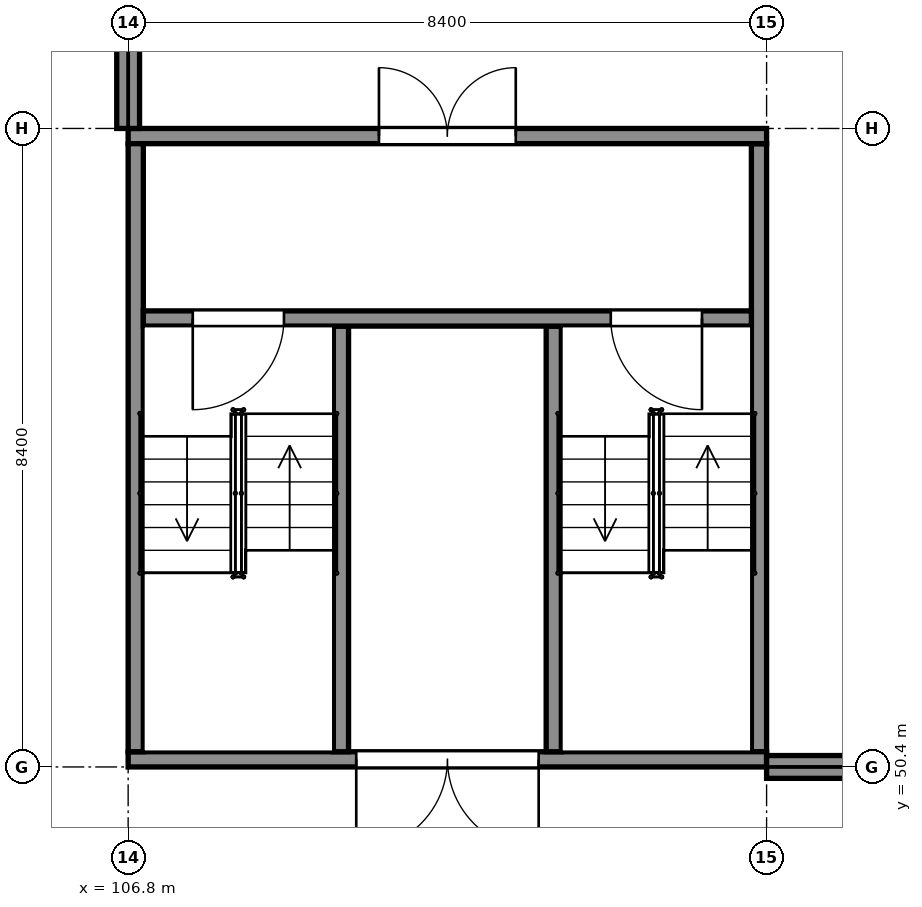
"""IFC4 building model, lengths in metres.
Left out: names, types, materials, properties, quantities, classifications, styles, units other than length and angle.
Written with IfcOpenShell. Run it as: python <this file> out.ifc"""

import sys

from ifc_helpers import new_model, si_unit, direction, frame, frame_2d, origin, place, context, subcontext, project, spatial, rectangle, extrude, element, fill, save


model = new_model("IFC4")
c1 = context("Model", 3, precision=1e-05, world=origin(), true_north=direction((0.0, 1.0)))
c2 = subcontext(c1, "Body", "Model", "MODEL_VIEW")
j1 = project(units=[si_unit("LENGTHUNIT", "METRE"), si_unit("PLANEANGLEUNIT", "RADIAN")], contexts=[c1])
p1 = place(None, origin())
s1 = spatial("IfcSite", under=j1, at=p1, CompositionType="ELEMENT")
p2 = place(p1, origin())
s2 = spatial("IfcBuilding", under=s1, at=p2, CompositionType="ELEMENT")
p3 = place(p2, origin())
s3 = spatial("IfcBuildingStorey", under=s2, at=p3, CompositionType="ELEMENT", Elevation=0.0)
p4 = place(p3, frame((115.2, 50.5, -1.8), z_axis=(0.0, 0.0, 1.0), x_axis=(-1.0, 0.0, 0.0)))
e1 = element("IfcWall", 1, at=p4, inside=s3, PredefinedType="SHEAR", context=c2, shape_type="SweptSolid", body=[
    extrude(rectangle(XDim=8.4, YDim=0.2, at=frame_2d((4.2, 0.0))), origin(), (0.0, 0.0, 1.0), 7.3),
])
p5 = place(p4, frame((2.999, 0.0, 1.8)))
e2 = element("IfcOpeningElement", 2, at=p5, cuts=e1, PredefinedType="OPENING", context=c2, shape_type="SweptSolid", body=[
    extrude(rectangle(XDim=2.4, YDim=2.1, at=frame_2d((1.2, 1.05))), frame((0.0, 0.11, 0.0), z_axis=(0.0, -1.0, 0.0), x_axis=(1.0, 0.0, 0.0)), (0.0, 0.0, 1.0), 0.22),
])
p6 = place(p3, frame((106.8, 58.7, -1.8), z_axis=(0.0, 0.0, 1.0), x_axis=(1.0, 0.0, 0.0)))
e3 = element("IfcWall", 3, at=p6, inside=s3, PredefinedType="SHEAR", context=c2, shape_type="SweptSolid", body=[
    extrude(rectangle(XDim=8.4, YDim=0.2, at=frame_2d((4.2, 0.0))), origin(), (0.0, 0.0, 1.0), 7.3),
])
p7 = place(p6, frame((3.3, 0.0, 1.8)))
e4 = element("IfcOpeningElement", 4, at=p7, cuts=e3, PredefinedType="OPENING", context=c2, shape_type="SweptSolid", body=[
    extrude(rectangle(XDim=1.8, YDim=2.1, at=frame_2d((0.9, 1.05))), frame((0.0, 0.11, 0.0), z_axis=(0.0, -1.0, 0.0), x_axis=(1.0, 0.0, 0.0)), (0.0, 0.0, 1.0), 0.22),
])
for number, where, z_axis, x_axis in (
    (5, (106.9, 50.6, -1.8), (0.0, 0.0, 1.0), (0.0, 1.0, 0.0)),
    (6, (115.1, 50.6, -1.8), (0.0, 0.0, 1.0), (0.0, 1.0, 0.0)),
):
    element("IfcWall", number, at=place(p3, frame(where, z_axis=z_axis, x_axis=x_axis)), inside=s3, PredefinedType="SHEAR", context=c2, shape_type="SweptSolid", body=[
        extrude(rectangle(XDim=8.0, YDim=0.2, at=frame_2d((4.0, 0.0))), origin(), (0.0, 0.0, 1.0), 7.3),
    ])
p8 = place(p3, frame((107.0, 56.3, -1.8), z_axis=(0.0, 0.0, 1.0), x_axis=(1.0, 0.0, 0.0)))
e7 = element("IfcWall", 7, at=p8, inside=s3, PredefinedType="SHEAR", context=c2, shape_type="SweptSolid", body=[
    extrude(rectangle(XDim=8.0, YDim=0.2, at=frame_2d((4.0, 0.0))), origin(), (0.0, 0.0, 1.0), 7.3),
])
p9 = place(p8, frame((0.65, 0.0, 1.8)))
e8 = element("IfcOpeningElement", 8, at=p9, cuts=e7, PredefinedType="OPENING", context=c2, shape_type="SweptSolid", body=[
    extrude(rectangle(XDim=1.2, YDim=2.1, at=frame_2d((0.6, 1.05))), frame((0.0, 0.11, 0.0), z_axis=(0.0, -1.0, 0.0), x_axis=(1.0, 0.0, 0.0)), (0.0, 0.0, 1.0), 0.22),
])
p10 = place(p8, frame((6.15, 0.0, 1.8)))
e9 = element("IfcOpeningElement", 9, at=p10, cuts=e7, PredefinedType="OPENING", context=c2, shape_type="SweptSolid", body=[
    extrude(rectangle(XDim=1.2, YDim=2.1, at=frame_2d((0.6, 1.05))), frame((0.0, 0.11, 0.0), z_axis=(0.0, -1.0, 0.0), x_axis=(1.0, 0.0, 0.0)), (0.0, 0.0, 1.0), 0.22),
])
for number, where, z_axis, x_axis in (
    (10, (109.6, 50.6, -1.8), (0.0, 0.0, 1.0), (0.0, 1.0, 0.0)),
    (11, (112.4, 50.6, -1.8), (0.0, 0.0, 1.0), (0.0, 1.0, 0.0)),
):
    element("IfcWall", number, at=place(p3, frame(where, z_axis=z_axis, x_axis=x_axis)), inside=s3, PredefinedType="SHEAR", context=c2, shape_type="SweptSolid", body=[
        extrude(rectangle(XDim=5.6, YDim=0.2, at=frame_2d((2.8, 0.0))), origin(), (0.0, 0.0, 1.0), 7.3),
    ])
p11 = place(p3, frame((106.8, 58.8, 0.0), z_axis=(0.0, 0.0, 1.0), x_axis=(0.0, 1.0, 0.0)))
e12 = element("IfcWall", 12, at=p11, inside=s3, PredefinedType="SOLIDWALL", context=c2, shape_type="SweptSolid", body=[
    extrude(rectangle(XDim=8.4, YDim=0.3, at=frame_2d((4.2, 0.0))), origin(), (0.0, 0.0, 1.0), 4.44),
])
p12 = place(p11, frame((2.5, 0.0, 1.5)))
e13 = element("IfcOpeningElement", 13, at=p12, cuts=e12, PredefinedType="OPENING", context=c2, shape_type="SweptSolid", body=[
    extrude(rectangle(XDim=0.6, YDim=2.4, at=frame_2d((0.3, 1.2))), frame((0.0, 0.16, 0.0), z_axis=(0.0, -1.0, 0.0), x_axis=(1.0, 0.0, 0.0)), (0.0, 0.0, 1.0), 0.32),
])
p13 = place(p11, frame((5.3, 0.0, 1.5)))
e14 = element("IfcOpeningElement", 14, at=p13, cuts=e12, PredefinedType="OPENING", context=c2, shape_type="SweptSolid", body=[
    extrude(rectangle(XDim=0.6, YDim=2.4, at=frame_2d((0.3, 1.2))), frame((0.0, 0.16, 0.0), z_axis=(0.0, -1.0, 0.0), x_axis=(1.0, 0.0, 0.0)), (0.0, 0.0, 1.0), 0.32),
])
p14 = place(p3, frame((115.2, 50.4, 0.0), z_axis=(0.0, 0.0, 1.0), x_axis=(1.0, 0.0, 0.0)))
e15 = element("IfcWall", 15, at=p14, inside=s3, PredefinedType="SOLIDWALL", context=c2, shape_type="SweptSolid", body=[
    extrude(rectangle(XDim=8.0, YDim=0.3, at=frame_2d((4.0, 0.0))), origin(), (0.0, 0.0, 1.0), 4.44),
])
p15 = place(p14, frame((2.3, 0.0, 1.5)))
e16 = element("IfcOpeningElement", 16, at=p15, cuts=e15, PredefinedType="OPENING", context=c2, shape_type="SweptSolid", body=[
    extrude(rectangle(XDim=0.6, YDim=2.4, at=frame_2d((0.3, 1.2))), frame((0.0, 0.16, 0.0), z_axis=(0.0, -1.0, 0.0), x_axis=(1.0, 0.0, 0.0)), (0.0, 0.0, 1.0), 0.32),
])
p16 = place(p14, frame((5.1, 0.0, 1.5)))
e17 = element("IfcOpeningElement", 17, at=p16, cuts=e15, PredefinedType="OPENING", context=c2, shape_type="SweptSolid", body=[
    extrude(rectangle(XDim=0.6, YDim=2.4, at=frame_2d((0.3, 1.2))), frame((0.0, 0.16, 0.0), z_axis=(0.0, -1.0, 0.0), x_axis=(1.0, 0.0, 0.0)), (0.0, 0.0, 1.0), 0.32),
])
p17 = place(p5, origin())
e18 = element("IfcDoor", 18, at=p17, inside=s3, OperationType="DOUBLE_DOOR_SINGLE_SWING", PredefinedType="DOOR", context=c2, shape_type="SweptSolid", body=[
    extrude(rectangle(XDim=2.4, YDim=2.1, at=frame_2d((1.2, 1.05))), frame((0.0, 0.025, 0.0), z_axis=(0.0, -1.0, 0.0), x_axis=(1.0, 0.0, 0.0)), (0.0, 0.0, 1.0), 0.05),
])
fill(e2, e18)
p18 = place(p7, origin())
e19 = element("IfcDoor", 19, at=p18, inside=s3, OperationType="DOUBLE_DOOR_SINGLE_SWING", PredefinedType="DOOR", context=c2, shape_type="SweptSolid", body=[
    extrude(rectangle(XDim=1.8, YDim=2.1, at=frame_2d((0.9, 1.05))), frame((0.0, 0.025, 0.0), z_axis=(0.0, -1.0, 0.0), x_axis=(1.0, 0.0, 0.0)), (0.0, 0.0, 1.0), 0.05),
])
fill(e4, e19)
p19 = place(p9, origin())
e20 = element("IfcDoor", 20, at=p19, inside=s3, OperationType="SINGLE_SWING_LEFT", PredefinedType="DOOR", context=c2, shape_type="SweptSolid", body=[
    extrude(rectangle(XDim=1.2, YDim=2.1, at=frame_2d((0.6, 1.05))), frame((0.0, 0.025, 0.0), z_axis=(0.0, -1.0, 0.0), x_axis=(1.0, 0.0, 0.0)), (0.0, 0.0, 1.0), 0.05),
])
fill(e8, e20)
p20 = place(p10, origin())
e21 = element("IfcDoor", 21, at=p20, inside=s3, OperationType="SINGLE_SWING_RIGHT", PredefinedType="DOOR", context=c2, shape_type="SweptSolid", body=[
    extrude(rectangle(XDim=1.2, YDim=2.1, at=frame_2d((0.6, 1.05))), frame((0.0, 0.025, 0.0), z_axis=(0.0, -1.0, 0.0), x_axis=(1.0, 0.0, 0.0)), (0.0, 0.0, 1.0), 0.05),
])
fill(e9, e21)
save(model, sys.argv[1])
